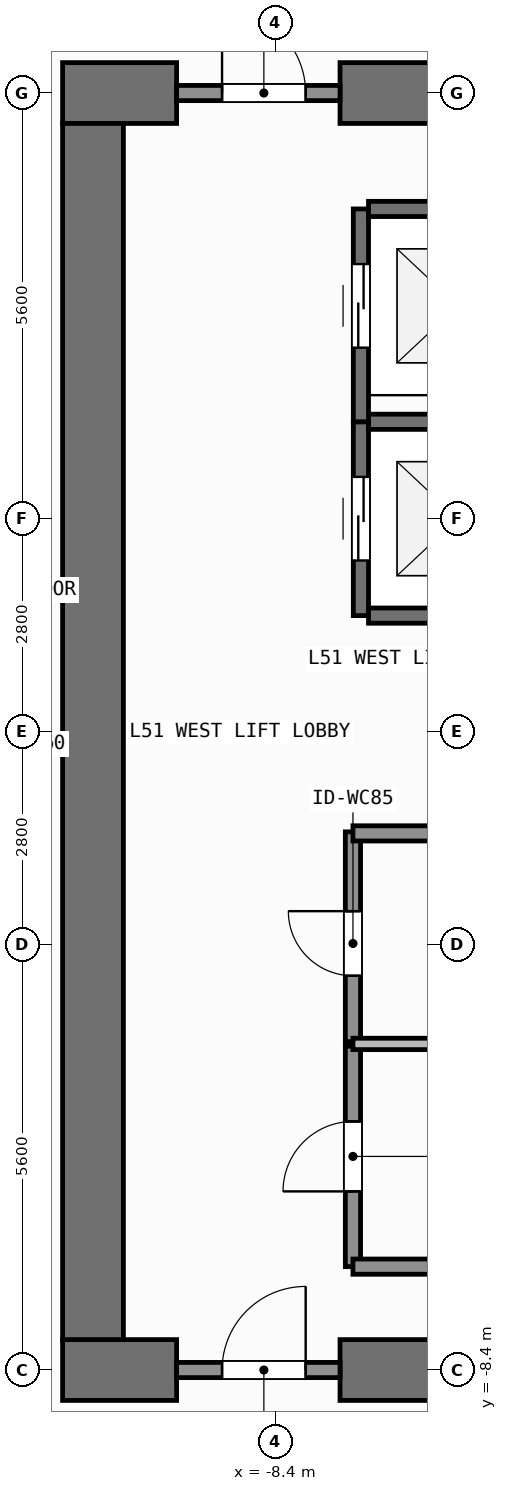
"""IFC4 building model, lengths in metres.
Left out: names, types, materials, properties, quantities, classifications, styles, units other than length and angle.
Written with IfcOpenShell. Run it as: python <this file> out.ifc"""

import sys

from ifc_helpers import new_model, si_unit, direction, frame, frame_2d, origin, place, context, subcontext, project, spatial, rectangle, extrude, element, fill, save


model = new_model("IFC4")
c1 = context("Model", 3, precision=1e-05, world=origin(), true_north=direction((0.0, 1.0)))
c2 = subcontext(c1, "Body", "Model", "MODEL_VIEW")
j1 = project(units=[si_unit("LENGTHUNIT", "METRE"), si_unit("PLANEANGLEUNIT", "RADIAN")], contexts=[c1])
p1 = place(None, origin())
s1 = spatial("IfcSite", under=j1, at=p1, CompositionType="ELEMENT")
p2 = place(p1, origin())
s2 = spatial("IfcBuilding", under=s1, at=p2, CompositionType="ELEMENT")
p3 = place(p2, frame((0.0, 0.0, 207.0)))
s3 = spatial("IfcBuildingStorey", under=s2, at=p3, CompositionType="ELEMENT", Elevation=207.0)
p4 = place(p3, frame((-11.2, -8.4, 0.0), z_axis=(0.0, 0.0, 1.0), x_axis=(1.0, 0.0, 0.0)))
e1 = element("IfcWall", 1, at=p4, inside=s3, PredefinedType="SHEAR", context=c2, shape_type="SweptSolid", body=[
    extrude(rectangle(XDim=1.5, YDim=0.8, at=frame_2d((0.75, 0.0))), origin(), (0.0, 0.0, 1.0), 3.9),
])
p5 = place(p3, frame((-7.55, -8.4, 0.0), z_axis=(0.0, 0.0, 1.0), x_axis=(1.0, 0.0, 0.0)))
e2 = element("IfcWall", 2, at=p5, inside=s3, PredefinedType="SHEAR", context=c2, shape_type="SweptSolid", body=[
    extrude(rectangle(XDim=3.35, YDim=0.8, at=frame_2d((1.675, 0.0))), origin(), (0.0, 0.0, 1.0), 3.9),
])
p6 = place(p3, frame((-11.2, 8.4, 0.0), z_axis=(0.0, 0.0, 1.0), x_axis=(1.0, 0.0, 0.0)))
e3 = element("IfcWall", 3, at=p6, inside=s3, PredefinedType="SHEAR", context=c2, shape_type="SweptSolid", body=[
    extrude(rectangle(XDim=1.5, YDim=0.8, at=frame_2d((0.75, 0.0))), origin(), (0.0, 0.0, 1.0), 3.9),
])
p7 = place(p3, frame((-7.55, 8.4, 0.0), z_axis=(0.0, 0.0, 1.0), x_axis=(1.0, 0.0, 0.0)))
e4 = element("IfcWall", 4, at=p7, inside=s3, PredefinedType="SHEAR", context=c2, shape_type="SweptSolid", body=[
    extrude(rectangle(XDim=16.35, YDim=0.8, at=frame_2d((8.175, 0.0))), origin(), (0.0, 0.0, 1.0), 3.9),
])
p8 = place(p3, frame((-10.8, -8.0, 0.0), z_axis=(0.0, 0.0, 1.0), x_axis=(0.0, 1.0, 0.0)))
e5 = element("IfcWall", 5, at=p8, inside=s3, PredefinedType="SHEAR", context=c2, shape_type="SweptSolid", body=[
    extrude(rectangle(XDim=16.0, YDim=0.8, at=frame_2d((8.0, 0.0))), origin(), (0.0, 0.0, 1.0), 3.9),
])
p9 = place(p3, frame((-7.275, 1.525, 0.0), z_axis=(0.0, 0.0, 1.0), x_axis=(0.0, 1.0, 0.0)))
e6 = element("IfcWall", 6, at=p9, inside=s3, PredefinedType="SHEAR", context=c2, shape_type="SweptSolid", body=[
    extrude(rectangle(XDim=2.55, YDim=0.2, at=frame_2d((1.275, 0.0))), origin(), (0.0, 0.0, 1.0), 3.62),
])
p10 = place(p9, frame((0.725, 0.0, 0.0)))
e7 = element("IfcOpeningElement", 7, at=p10, cuts=e6, PredefinedType="OPENING", context=c2, shape_type="SweptSolid", body=[
    extrude(rectangle(XDim=1.1, YDim=2.2, at=frame_2d((0.55, 1.1))), frame((0.0, 0.11, 0.0), z_axis=(0.0, -1.0, 0.0), x_axis=(1.0, 0.0, 0.0)), (0.0, 0.0, 1.0), 0.22),
])
for number, where, z_axis, x_axis in (
    (8, (-7.175, 1.525, 0.0), (0.0, 0.0, 1.0), (1.0, 0.0, 0.0)),
    (9, (-7.175, 4.075, 0.0), (0.0, 0.0, 1.0), (1.0, 0.0, 0.0)),
):
    element("IfcWall", number, at=place(p3, frame(where, z_axis=z_axis, x_axis=x_axis)), inside=s3, PredefinedType="SHEAR", context=c2, shape_type="SweptSolid", body=[
        extrude(rectangle(XDim=2.35, YDim=0.2, at=frame_2d((1.175, 0.0))), origin(), (0.0, 0.0, 1.0), 3.62),
    ])
p11 = place(p3, frame((-7.275, 4.075, 0.0), z_axis=(0.0, 0.0, 1.0), x_axis=(0.0, 1.0, 0.0)))
e10 = element("IfcWall", 10, at=p11, inside=s3, PredefinedType="SHEAR", context=c2, shape_type="SweptSolid", body=[
    extrude(rectangle(XDim=2.8, YDim=0.2, at=frame_2d((1.4, 0.0))), origin(), (0.0, 0.0, 1.0), 3.62),
])
p12 = place(p11, frame((0.975, 0.0, 0.0)))
e11 = element("IfcOpeningElement", 11, at=p12, cuts=e10, PredefinedType="OPENING", context=c2, shape_type="SweptSolid", body=[
    extrude(rectangle(XDim=1.1, YDim=2.2, at=frame_2d((0.55, 1.1))), frame((0.0, 0.11, 0.0), z_axis=(0.0, -1.0, 0.0), x_axis=(1.0, 0.0, 0.0)), (0.0, 0.0, 1.0), 0.22),
])
p13 = place(p3, frame((-7.175, 6.875, 0.0), z_axis=(0.0, 0.0, 1.0), x_axis=(1.0, 0.0, 0.0)))
e12 = element("IfcWall", 12, at=p13, inside=s3, PredefinedType="SHEAR", context=c2, shape_type="SweptSolid", body=[
    extrude(rectangle(XDim=2.35, YDim=0.2, at=frame_2d((1.175, 0.0))), origin(), (0.0, 0.0, 1.0), 3.62),
])
p14 = place(p3, frame((-9.7, -8.4, 0.0), z_axis=(0.0, 0.0, 1.0), x_axis=(1.0, 0.0, 0.0)))
e13 = element("IfcWall", 13, at=p14, inside=s3, PredefinedType="SOLIDWALL", context=c2, shape_type="SweptSolid", body=[
    extrude(rectangle(XDim=2.15, YDim=0.2, at=frame_2d((1.075, 0.0))), origin(), (0.0, 0.0, 1.0), 2.76),
])
p15 = place(p14, frame((0.598, 0.0, 0.0)))
e14 = element("IfcOpeningElement", 14, at=p15, cuts=e13, PredefinedType="OPENING", context=c2, shape_type="SweptSolid", body=[
    extrude(rectangle(XDim=1.1, YDim=2.15, at=frame_2d((0.55, 1.075))), frame((0.0, 0.11, 0.0), z_axis=(0.0, -1.0, 0.0), x_axis=(1.0, 0.0, 0.0)), (0.0, 0.0, 1.0), 0.22),
])
p16 = place(p3, frame((-9.7, 8.4, 0.0), z_axis=(0.0, 0.0, 1.0), x_axis=(1.0, 0.0, 0.0)))
e15 = element("IfcWall", 15, at=p16, inside=s3, PredefinedType="SOLIDWALL", context=c2, shape_type="SweptSolid", body=[
    extrude(rectangle(XDim=2.15, YDim=0.2, at=frame_2d((1.075, 0.0))), origin(), (0.0, 0.0, 1.0), 2.76),
])
p17 = place(p16, frame((0.598, 0.0, 0.0)))
e16 = element("IfcOpeningElement", 16, at=p17, cuts=e15, PredefinedType="OPENING", context=c2, shape_type="SweptSolid", body=[
    extrude(rectangle(XDim=1.1, YDim=2.15, at=frame_2d((0.55, 1.075))), frame((0.0, 0.11, 0.0), z_axis=(0.0, -1.0, 0.0), x_axis=(1.0, 0.0, 0.0)), (0.0, 0.0, 1.0), 0.22),
])
p18 = place(p3, frame((-7.38, -7.04, 0.0), z_axis=(0.0, 0.0, 1.0), x_axis=(0.0, 1.0, 0.0)))
e17 = element("IfcWall", 17, at=p18, inside=s3, PredefinedType="SOLIDWALL", context=c2, shape_type="SweptSolid", body=[
    extrude(rectangle(XDim=2.9, YDim=0.2, at=frame_2d((1.45, 0.0))), origin(), (0.0, 0.0, 1.0), 3.62),
])
p19 = place(p18, frame((0.99, 0.0, 0.0)))
e18 = element("IfcOpeningElement", 18, at=p19, cuts=e17, PredefinedType="OPENING", context=c2, shape_type="SweptSolid", body=[
    extrude(rectangle(XDim=0.92, YDim=2.1, at=frame_2d((0.46, 1.05))), frame((0.0, 0.11, 0.0), z_axis=(0.0, -1.0, 0.0), x_axis=(1.0, 0.0, 0.0)), (0.0, 0.0, 1.0), 0.22),
])
p20 = place(p3, frame((-7.38, -4.08, 0.0), z_axis=(0.0, 0.0, 1.0), x_axis=(0.0, 1.0, 0.0)))
e19 = element("IfcWall", 19, at=p20, inside=s3, PredefinedType="SOLIDWALL", context=c2, shape_type="SweptSolid", body=[
    extrude(rectangle(XDim=2.76, YDim=0.2, at=frame_2d((1.38, 0.0))), origin(), (0.0, 0.0, 1.0), 3.62),
])
p21 = place(p20, frame((0.867, 0.0, 0.0)))
e20 = element("IfcOpeningElement", 20, at=p21, cuts=e19, PredefinedType="OPENING", context=c2, shape_type="SweptSolid", body=[
    extrude(rectangle(XDim=0.85, YDim=2.1, at=frame_2d((0.425, 1.05))), frame((0.0, 0.11, 0.0), z_axis=(0.0, -1.0, 0.0), x_axis=(1.0, 0.0, 0.0)), (0.0, 0.0, 1.0), 0.22),
])
p22 = place(p3, frame((-7.38, -1.34, 0.0), z_axis=(0.0, 0.0, 1.0), x_axis=(1.0, 0.0, 0.0)))
e21 = element("IfcWall", 21, at=p22, inside=s3, PredefinedType="SOLIDWALL", context=c2, shape_type="SweptSolid", body=[
    extrude(rectangle(XDim=2.91, YDim=0.2, at=frame_2d((1.455, 0.0))), origin(), (0.0, 0.0, 1.0), 3.62),
])
p23 = place(p3, frame((-7.38, -7.04, 0.0), z_axis=(0.0, 0.0, 1.0), x_axis=(1.0, 0.0, 0.0)))
e22 = element("IfcWall", 22, at=p23, inside=s3, PredefinedType="SOLIDWALL", context=c2, shape_type="SweptSolid", body=[
    extrude(rectangle(XDim=2.8, YDim=0.2, at=frame_2d((1.4, 0.0))), origin(), (0.0, 0.0, 1.0), 3.62),
])
p24 = place(p3, frame((-7.38, -4.11, 0.0), z_axis=(0.0, 0.0, 1.0), x_axis=(1.0, 0.0, 0.0)))
e23 = element("IfcWall", 23, at=p24, inside=s3, PredefinedType="PARTITIONING", context=c2, shape_type="SweptSolid", body=[
    extrude(rectangle(XDim=2.8, YDim=0.15, at=frame_2d((1.4, 0.0))), origin(), (0.0, 0.0, 1.0), 3.62),
])
p25 = place(p10, origin())
e24 = element("IfcDoor", 24, at=p25, inside=s3, OperationType="SLIDING_TO_LEFT", PredefinedType="DOOR", context=c2, shape_type="SweptSolid", body=[
    extrude(rectangle(XDim=1.1, YDim=2.2, at=frame_2d((0.55, 1.1))), frame((0.0, 0.025, 0.0), z_axis=(0.0, -1.0, 0.0), x_axis=(1.0, 0.0, 0.0)), (0.0, 0.0, 1.0), 0.05),
])
fill(e7, e24)
p26 = place(p12, origin())
e25 = element("IfcDoor", 25, at=p26, inside=s3, OperationType="SLIDING_TO_LEFT", PredefinedType="DOOR", context=c2, shape_type="SweptSolid", body=[
    extrude(rectangle(XDim=1.1, YDim=2.2, at=frame_2d((0.55, 1.1))), frame((0.0, 0.025, 0.0), z_axis=(0.0, -1.0, 0.0), x_axis=(1.0, 0.0, 0.0)), (0.0, 0.0, 1.0), 0.05),
])
fill(e11, e25)
p27 = place(p15, origin())
e26 = element("IfcDoor", 26, at=p27, inside=s3, OperationType="SINGLE_SWING_RIGHT", PredefinedType="DOOR", context=c2, shape_type="SweptSolid", body=[
    extrude(rectangle(XDim=1.1, YDim=2.15, at=frame_2d((0.55, 1.075))), frame((0.0, 0.025, 0.0), z_axis=(0.0, -1.0, 0.0), x_axis=(1.0, 0.0, 0.0)), (0.0, 0.0, 1.0), 0.05),
])
fill(e14, e26)
p28 = place(p17, origin())
e27 = element("IfcDoor", 27, at=p28, inside=s3, OperationType="SINGLE_SWING_LEFT", PredefinedType="DOOR", context=c2, shape_type="SweptSolid", body=[
    extrude(rectangle(XDim=1.1, YDim=2.15, at=frame_2d((0.55, 1.075))), frame((0.0, 0.025, 0.0), z_axis=(0.0, -1.0, 0.0), x_axis=(1.0, 0.0, 0.0)), (0.0, 0.0, 1.0), 0.05),
])
fill(e16, e27)
p29 = place(p19, origin())
e28 = element("IfcDoor", 28, at=p29, inside=s3, OperationType="SINGLE_SWING_LEFT", PredefinedType="DOOR", context=c2, shape_type="SweptSolid", body=[
    extrude(rectangle(XDim=0.92, YDim=2.1, at=frame_2d((0.46, 1.05))), frame((0.0, 0.025, 0.0), z_axis=(0.0, -1.0, 0.0), x_axis=(1.0, 0.0, 0.0)), (0.0, 0.0, 1.0), 0.05),
])
fill(e18, e28)
p30 = place(p21, origin())
e29 = element("IfcDoor", 29, at=p30, inside=s3, OperationType="SINGLE_SWING_RIGHT", PredefinedType="DOOR", context=c2, shape_type="SweptSolid", body=[
    extrude(rectangle(XDim=0.85, YDim=2.1, at=frame_2d((0.425, 1.05))), frame((0.0, 0.025, 0.0), z_axis=(0.0, -1.0, 0.0), x_axis=(1.0, 0.0, 0.0)), (0.0, 0.0, 1.0), 0.05),
])
fill(e20, e29)
save(model, sys.argv[1])
